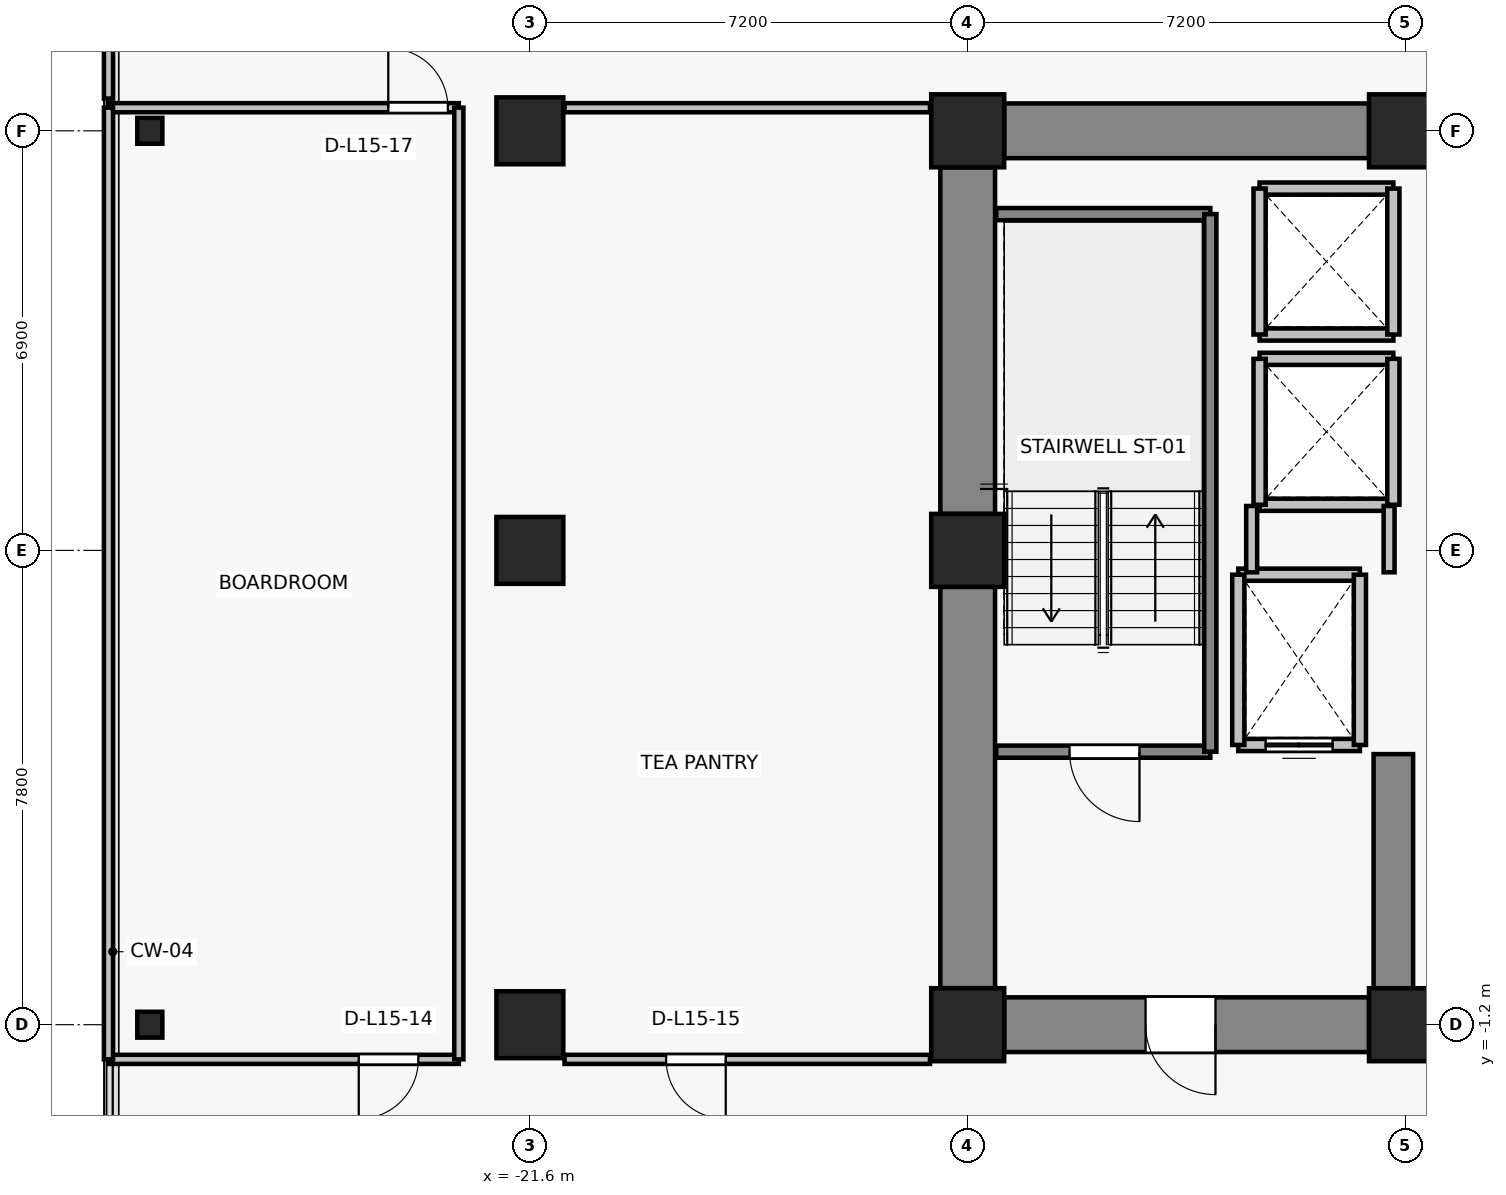
"""IFC4 building model, lengths in metres.
Left out: names, types, materials, properties, quantities, classifications, styles, units other than length and angle.
Written with IfcOpenShell. Run it as: python <this file> out.ifc"""

import sys

from ifc_helpers import new_model, si_unit, direction, frame, frame_2d, origin, origin_2d, place, context, subcontext, project, spatial, rectangle, i_section, extrude, source, transform, mapped, element, fill, save


model = new_model("IFC4")
c1 = context("Model", 3, precision=1e-05, world=origin(), true_north=direction((0.0, 1.0)))
c2 = subcontext(c1, "Body", "Model", "MODEL_VIEW")
j1 = project(units=[si_unit("LENGTHUNIT", "METRE"), si_unit("PLANEANGLEUNIT", "RADIAN")], contexts=[c1])
p1 = place(None, origin())
s1 = spatial("IfcSite", under=j1, at=p1, CompositionType="ELEMENT")
p2 = place(p1, origin())
s2 = spatial("IfcBuilding", under=s1, at=p2, CompositionType="ELEMENT")
p3 = place(p2, frame((0.0, 0.0, 57.1)))
s3 = spatial("IfcBuildingStorey", under=s2, at=p3, CompositionType="ELEMENT", Elevation=57.1)
for number, where, z_axis, x_axis in (
    (1, (-14.4, -1.2, 0.0), (0.0, 0.0, 1.0), (1.0, 0.0, 0.0)),
    (2, (-7.2, -1.2, 0.0), (0.0, 0.0, 1.0), (1.0, 0.0, 0.0)),
    (3, (-14.4, 6.6, 0.0), (0.0, 0.0, 1.0), (1.0, 0.0, 0.0)),
    (4, (-14.4, 13.5, 0.0), (0.0, 0.0, 1.0), (1.0, 0.0, 0.0)),
    (5, (-7.2, 13.5, 0.0), (0.0, 0.0, 1.0), (1.0, 0.0, 0.0)),
):
    element("IfcColumn", number, at=place(p3, frame(where, z_axis=z_axis, x_axis=x_axis)), inside=s3, PredefinedType="COLUMN", context=c2, shape_type="SweptSolid", body=[
        extrude(rectangle(XDim=1.2, YDim=1.2, at=origin_2d()), origin(), (0.0, 0.0, 1.0), 3.3),
    ])
for number, where, z_axis, x_axis in (
    (6, (-21.6, -1.2, 0.0), (0.0, 0.0, 1.0), (1.0, 0.0, 0.0)),
    (7, (-21.6, 6.6, 0.0), (0.0, 0.0, 1.0), (1.0, 0.0, 0.0)),
    (8, (-21.6, 13.5, 0.0), (0.0, 0.0, 1.0), (1.0, 0.0, 0.0)),
):
    element("IfcColumn", number, at=place(p3, frame(where, z_axis=z_axis, x_axis=x_axis)), inside=s3, PredefinedType="COLUMN", context=c2, shape_type="SweptSolid", body=[
        extrude(rectangle(XDim=1.1, YDim=1.1, at=origin_2d()), origin(), (0.0, 0.0, 1.0), 3.3),
    ])
for number, where, z_axis, x_axis in (
    (9, (-27.85, -1.2, 0.0), (0.0, 0.0, 1.0), (1.0, 0.0, 0.0)),
    (10, (-27.85, 13.5, 0.0), (0.0, 0.0, 1.0), (1.0, 0.0, 0.0)),
):
    element("IfcColumn", number, at=place(p3, frame(where, z_axis=z_axis, x_axis=x_axis)), inside=s3, PredefinedType="COLUMN", context=c2, shape_type="SweptSolid", body=[
        extrude(i_section(OverallWidth=0.412, OverallDepth=0.425, WebThickness=0.026, FlangeThickness=0.039, FilletRadius=0.015, at=origin_2d()), origin(), (0.0, 0.0, 1.0), 3.3),
    ])
p4 = place(p3, frame((-13.8, 13.5, 0.0), z_axis=(0.0, 0.0, 1.0), x_axis=(1.0, 0.0, 0.0)))
e11 = element("IfcWall", 11, at=p4, inside=s3, PredefinedType="SHEAR", context=c2, shape_type="SweptSolid", body=[
    extrude(rectangle(XDim=6.0, YDim=0.9, at=frame_2d((3.0, 0.0))), origin(), (0.0, 0.0, 1.0), 3.075),
])
p5 = place(p3, frame((-14.4, -0.6, 0.0), z_axis=(0.0, 0.0, 1.0), x_axis=(0.0, 1.0, 0.0)))
e12 = element("IfcWall", 12, at=p5, inside=s3, PredefinedType="SHEAR", context=c2, shape_type="SweptSolid", body=[
    extrude(rectangle(XDim=6.6, YDim=0.9, at=frame_2d((3.3, 0.0))), origin(), (0.0, 0.0, 1.0), 3.075),
])
p6 = place(p3, frame((-14.4, 7.2, 0.0), z_axis=(0.0, 0.0, 1.0), x_axis=(0.0, 1.0, 0.0)))
e13 = element("IfcWall", 13, at=p6, inside=s3, PredefinedType="SHEAR", context=c2, shape_type="SweptSolid", body=[
    extrude(rectangle(XDim=5.7, YDim=0.9, at=frame_2d((2.85, 0.0))), origin(), (0.0, 0.0, 1.0), 3.075),
])
p7 = place(p3, frame((-7.8, -1.2, 0.0), z_axis=(0.0, 0.0, 1.0), x_axis=(-1.0, 0.0, 0.0)))
e14 = element("IfcWall", 14, at=p7, inside=s3, PredefinedType="SHEAR", context=c2, shape_type="SweptSolid", body=[
    extrude(rectangle(XDim=6.0, YDim=0.9, at=frame_2d((3.0, 0.0))), origin(), (0.0, 0.0, 1.0), 3.075),
])
p8 = place(p7, frame((2.525, 0.0, 0.0)))
e15 = element("IfcOpeningElement", 15, at=p8, cuts=e14, PredefinedType="OPENING", context=c2, shape_type="SweptSolid", body=[
    extrude(rectangle(XDim=1.15, YDim=2.15, at=frame_2d((0.575, 1.075))), frame((0.0, 0.46, 0.0), z_axis=(0.0, -1.0, 0.0), x_axis=(1.0, 0.0, 0.0)), (0.0, 0.0, 1.0), 0.92),
])
p9 = place(p3, frame((-7.4, -0.75, 0.0), z_axis=(0.0, 0.0, 1.0), x_axis=(0.0, 1.0, 0.0)))
e16 = element("IfcWall", 16, at=p9, inside=s3, PredefinedType="SHEAR", context=c2, shape_type="SweptSolid", body=[
    extrude(rectangle(XDim=4.0, YDim=0.65, at=frame_2d((2.0, 0.0))), origin(), (0.0, 0.0, 1.0), 3.075),
])
p10 = place(p3, frame((-7.95, 3.4, 0.0), z_axis=(0.0, 0.0, 1.0), x_axis=(-1.0, 0.0, 0.0)))
e17 = element("IfcWall", 17, at=p10, inside=s3, PredefinedType="SOLIDWALL", context=c2, shape_type="SweptSolid", body=[
    extrude(rectangle(XDim=2.0, YDim=0.2, at=frame_2d((1.0, 0.0))), origin(), (0.0, 0.0, 1.0), 3.075),
])
p11 = place(p10, frame((0.45, 0.0, 0.0)))
e18 = element("IfcOpeningElement", 18, at=p11, cuts=e17, PredefinedType="OPENING", context=c2, shape_type="SweptSolid", body=[
    extrude(rectangle(XDim=1.1, YDim=2.2, at=frame_2d((0.55, 1.1))), frame((0.0, 0.11, 0.0), z_axis=(0.0, -1.0, 0.0), x_axis=(1.0, 0.0, 0.0)), (0.0, 0.0, 1.0), 0.22),
])
p12 = place(p3, frame((-9.95, 6.2, 0.0), z_axis=(0.0, 0.0, 1.0), x_axis=(1.0, 0.0, 0.0)))
e19 = element("IfcWall", 19, at=p12, inside=s3, PredefinedType="SOLIDWALL", context=c2, shape_type="SweptSolid", body=[
    extrude(rectangle(XDim=2.0, YDim=0.2, at=frame_2d((1.0, 0.0))), origin(), (0.0, 0.0, 1.0), 3.075),
])
for number, where, z_axis, x_axis in (
    (20, (-9.95, 3.4, 0.0), (0.0, 0.0, 1.0), (0.0, 1.0, 0.0)),
    (21, (-7.95, 6.2, 0.0), (0.0, 0.0, 1.0), (0.0, -1.0, 0.0)),
):
    element("IfcWall", number, at=place(p3, frame(where, z_axis=z_axis, x_axis=x_axis)), inside=s3, PredefinedType="SOLIDWALL", context=c2, shape_type="SweptSolid", body=[
        extrude(rectangle(XDim=2.8, YDim=0.2, at=frame_2d((1.4, 0.0))), origin(), (0.0, 0.0, 1.0), 3.075),
    ])
for number, where, z_axis, x_axis in (
    (22, (-7.4, 7.35, 0.0), (0.0, 0.0, 1.0), (-1.0, 0.0, 0.0)),
    (23, (-9.6, 9.75, 0.0), (0.0, 0.0, 1.0), (1.0, 0.0, 0.0)),
):
    element("IfcWall", number, at=place(p3, frame(where, z_axis=z_axis, x_axis=x_axis)), inside=s3, PredefinedType="SOLIDWALL", context=c2, shape_type="SweptSolid", body=[
        extrude(rectangle(XDim=2.2, YDim=0.2, at=frame_2d((1.1, 0.0))), origin(), (0.0, 0.0, 1.0), 2.465),
    ])
p13 = place(p3, frame((-9.6, 7.35, 0.0), z_axis=(0.0, 0.0, 1.0), x_axis=(0.0, 1.0, 0.0)))
e24 = element("IfcWall", 24, at=p13, inside=s3, PredefinedType="SOLIDWALL", context=c2, shape_type="SweptSolid", body=[
    extrude(rectangle(XDim=2.4, YDim=0.2, at=frame_2d((1.2, 0.0))), origin(), (0.0, 0.0, 1.0), 3.075),
])
p14 = place(p3, frame((-7.4, 9.75, 0.0), z_axis=(0.0, 0.0, 1.0), x_axis=(0.0, -1.0, 0.0)))
e25 = element("IfcWall", 25, at=p14, inside=s3, PredefinedType="SOLIDWALL", context=c2, shape_type="SweptSolid", body=[
    extrude(rectangle(XDim=2.4, YDim=0.2, at=frame_2d((1.2, 0.0))), origin(), (0.0, 0.0, 1.0), 2.465),
])
for number, where, z_axis, x_axis in (
    (26, (-7.4, 10.15, 0.0), (0.0, 0.0, 1.0), (-1.0, 0.0, 0.0)),
    (27, (-9.6, 12.55, 0.0), (0.0, 0.0, 1.0), (1.0, 0.0, 0.0)),
):
    element("IfcWall", number, at=place(p3, frame(where, z_axis=z_axis, x_axis=x_axis)), inside=s3, PredefinedType="SOLIDWALL", context=c2, shape_type="SweptSolid", body=[
        extrude(rectangle(XDim=2.2, YDim=0.2, at=frame_2d((1.1, 0.0))), origin(), (0.0, 0.0, 1.0), 2.465),
    ])
p15 = place(p3, frame((-9.6, 10.15, 0.0), z_axis=(0.0, 0.0, 1.0), x_axis=(0.0, 1.0, 0.0)))
e28 = element("IfcWall", 28, at=p15, inside=s3, PredefinedType="SOLIDWALL", context=c2, shape_type="SweptSolid", body=[
    extrude(rectangle(XDim=2.4, YDim=0.2, at=frame_2d((1.2, 0.0))), origin(), (0.0, 0.0, 1.0), 3.075),
])
p16 = place(p3, frame((-7.4, 12.55, 0.0), z_axis=(0.0, 0.0, 1.0), x_axis=(0.0, -1.0, 0.0)))
e29 = element("IfcWall", 29, at=p16, inside=s3, PredefinedType="SOLIDWALL", context=c2, shape_type="SweptSolid", body=[
    extrude(rectangle(XDim=2.4, YDim=0.2, at=frame_2d((1.2, 0.0))), origin(), (0.0, 0.0, 1.0), 2.465),
])
p17 = place(p3, frame((-10.41, 3.29, 0.0), z_axis=(0.0, 0.0, 1.0), x_axis=(-1.0, 0.0, 0.0)))
e30 = element("IfcWall", 30, at=p17, inside=s3, PredefinedType="SOLIDWALL", context=c2, shape_type="SweptSolid", body=[
    extrude(rectangle(XDim=3.52, YDim=0.2, at=frame_2d((1.76, 0.0))), origin(), (0.0, 0.0, 1.0), 3.075),
])
p18 = place(p17, frame((1.165, 0.0, 0.0)))
e31 = element("IfcOpeningElement", 31, at=p18, cuts=e30, PredefinedType="OPENING", context=c2, shape_type="SweptSolid", body=[
    extrude(rectangle(XDim=1.15, YDim=2.15, at=frame_2d((0.575, 1.075))), frame((0.0, 0.11, 0.0), z_axis=(0.0, -1.0, 0.0), x_axis=(1.0, 0.0, 0.0)), (0.0, 0.0, 1.0), 0.22),
])
p19 = place(p3, frame((-13.93, 12.13, 0.0), z_axis=(0.0, 0.0, 1.0), x_axis=(1.0, 0.0, 0.0)))
e32 = element("IfcWall", 32, at=p19, inside=s3, PredefinedType="SOLIDWALL", context=c2, shape_type="SweptSolid", body=[
    extrude(rectangle(XDim=3.52, YDim=0.2, at=frame_2d((1.76, 0.0))), origin(), (0.0, 0.0, 1.0), 3.075),
])
p20 = place(p3, frame((-10.41, 12.13, 0.0), z_axis=(0.0, 0.0, 1.0), x_axis=(0.0, -1.0, 0.0)))
e33 = element("IfcWall", 33, at=p20, inside=s3, PredefinedType="SOLIDWALL", context=c2, shape_type="SweptSolid", body=[
    extrude(rectangle(XDim=8.84, YDim=0.2, at=frame_2d((4.42, 0.0))), origin(), (0.0, 0.0, 1.0), 3.075),
])
p21 = place(p3, frame((-9.73, 6.24, 0.0), z_axis=(0.0, 0.0, 1.0), x_axis=(0.0, 1.0, 0.0)))
e34 = element("IfcWall", 34, at=p21, inside=s3, PredefinedType="PARTITIONING", context=c2, shape_type="SweptSolid", body=[
    extrude(rectangle(XDim=1.09, YDim=0.18, at=frame_2d((0.545, 0.0))), origin(), (0.0, 0.0, 1.0), 3.075),
])
p22 = place(p3, frame((-7.47, 7.33, 0.0), z_axis=(0.0, 0.0, 1.0), x_axis=(0.0, -1.0, 0.0)))
e35 = element("IfcWall", 35, at=p22, inside=s3, PredefinedType="PARTITIONING", context=c2, shape_type="SweptSolid", body=[
    extrude(rectangle(XDim=1.09, YDim=0.18, at=frame_2d((0.545, 0.0))), origin(), (0.0, 0.0, 1.0), 2.465),
])
p23 = place(p3, frame((-22.769, -1.77, 0.0), z_axis=(0.0, 0.0, 1.0), x_axis=(-1.0, 0.0, 0.0)))
e36 = element("IfcWall", 36, at=p23, inside=s3, PredefinedType="PARTITIONING", context=c2, shape_type="SweptSolid", body=[
    extrude(rectangle(XDim=5.761, YDim=0.15, at=frame_2d((2.881, 0.0))), origin(), (0.0, 0.0, 1.0), 2.465),
])
p24 = place(p23, frame((0.666, 0.0, 0.0)))
e37 = element("IfcOpeningElement", 37, at=p24, cuts=e36, PredefinedType="OPENING", context=c2, shape_type="SweptSolid", body=[
    extrude(rectangle(XDim=0.98, YDim=2.15, at=frame_2d((0.49, 1.075))), frame((0.0, 0.085, 0.0), z_axis=(0.0, -1.0, 0.0), x_axis=(1.0, 0.0, 0.0)), (0.0, 0.0, 1.0), 0.17),
])
p25 = place(p3, frame((-28.53, 13.88, 0.0), z_axis=(0.0, 0.0, 1.0), x_axis=(1.0, 0.0, 0.0)))
e38 = element("IfcWall", 38, at=p25, inside=s3, PredefinedType="PARTITIONING", context=c2, shape_type="SweptSolid", body=[
    extrude(rectangle(XDim=5.761, YDim=0.15, at=frame_2d((2.881, 0.0))), origin(), (0.0, 0.0, 1.0), 3.075),
])
p26 = place(p25, frame((4.602, 0.0, 0.0)))
e39 = element("IfcOpeningElement", 39, at=p26, cuts=e38, PredefinedType="OPENING", context=c2, shape_type="SweptSolid", body=[
    extrude(rectangle(XDim=0.98, YDim=2.15, at=frame_2d((0.49, 1.075))), frame((0.0, 0.085, 0.0), z_axis=(0.0, -1.0, 0.0), x_axis=(1.0, 0.0, 0.0)), (0.0, 0.0, 1.0), 0.17),
])
p27 = place(p3, frame((-28.53, -1.77, 0.0), z_axis=(0.0, 0.0, 1.0), x_axis=(0.0, 1.0, 0.0)))
e40 = element("IfcWall", 40, at=p27, inside=s3, PredefinedType="PARTITIONING", context=c2, shape_type="SweptSolid", body=[
    extrude(rectangle(XDim=15.65, YDim=0.15, at=frame_2d((7.825, 0.0))), origin(), (0.0, 0.0, 1.0), 3.075),
])
p28 = place(p3, frame((-22.769, 13.88, 0.0), z_axis=(0.0, 0.0, 1.0), x_axis=(0.0, -1.0, 0.0)))
e41 = element("IfcWall", 41, at=p28, inside=s3, PredefinedType="PARTITIONING", context=c2, shape_type="SweptSolid", body=[
    extrude(rectangle(XDim=15.65, YDim=0.15, at=frame_2d((7.825, 0.0))), origin(), (0.0, 0.0, 1.0), 2.465),
])
p29 = place(p3, frame((-15.02, -1.77, 0.0), z_axis=(0.0, 0.0, 1.0), x_axis=(-1.0, 0.0, 0.0)))
e42 = element("IfcWall", 42, at=p29, inside=s3, PredefinedType="PARTITIONING", context=c2, shape_type="SweptSolid", body=[
    extrude(rectangle(XDim=6.01, YDim=0.15, at=frame_2d((3.005, 0.0))), origin(), (0.0, 0.0, 1.0), 3.075),
])
p30 = place(p29, frame((3.359, 0.0, 0.0)))
e43 = element("IfcOpeningElement", 43, at=p30, cuts=e42, PredefinedType="OPENING", context=c2, shape_type="SweptSolid", body=[
    extrude(rectangle(XDim=0.98, YDim=2.15, at=frame_2d((0.49, 1.075))), frame((0.0, 0.085, 0.0), z_axis=(0.0, -1.0, 0.0), x_axis=(1.0, 0.0, 0.0)), (0.0, 0.0, 1.0), 0.17),
])
p31 = place(p3, frame((-21.03, 13.88, 0.0), z_axis=(0.0, 0.0, 1.0), x_axis=(1.0, 0.0, 0.0)))
e44 = element("IfcWall", 44, at=p31, inside=s3, PredefinedType="PARTITIONING", context=c2, shape_type="SweptSolid", body=[
    extrude(rectangle(XDim=6.01, YDim=0.15, at=frame_2d((3.005, 0.0))), origin(), (0.0, 0.0, 1.0), 3.075),
])
p32 = place(p3, frame((-28.53, 14.03, 0.0), z_axis=(0.0, 0.0, 1.0), x_axis=(0.0, 1.0, 0.0)))
e45 = element("IfcWall", 45, at=p32, inside=s3, PredefinedType="PARTITIONING", context=c2, shape_type="SweptSolid", body=[
    extrude(rectangle(XDim=4.1, YDim=0.15, at=frame_2d((2.05, 0.0))), origin(), (0.0, 0.0, 1.0), 3.075),
])
m1 = source(origin(), c2, "Body", "SweptSolid", [
    extrude(rectangle(XDim=1.1, YDim=2.2, at=frame_2d((0.55, 1.1))), frame((0.0, 0.025, 0.0), z_axis=(0.0, -1.0, 0.0), x_axis=(1.0, 0.0, 0.0)), (0.0, 0.0, 1.0), 0.05),
])
p33 = place(p11, origin())
e46 = element("IfcDoor", 46, at=p33, inside=s3, OperationType="DOUBLE_DOOR_SLIDING", PredefinedType="DOOR", context=c2, shape_type="MappedRepresentation", body=[
    mapped(m1, transform((0.0, 0.0, 0.0), x_axis=(1.0, 0.0, 0.0), y_axis=(0.0, 1.0, 0.0), z_axis=(0.0, 0.0, 1.0), scale=1.0)),
])
fill(e18, e46)
m2 = source(origin(), c2, "Body", "SweptSolid", [
    extrude(rectangle(XDim=1.15, YDim=2.15, at=frame_2d((0.575, 1.075))), frame((0.0, 0.025, 0.0), z_axis=(0.0, -1.0, 0.0), x_axis=(1.0, 0.0, 0.0)), (0.0, 0.0, 1.0), 0.05),
])
p34 = place(p18, origin())
e47 = element("IfcDoor", 47, at=p34, inside=s3, OperationType="SINGLE_SWING_LEFT", PredefinedType="DOOR", context=c2, shape_type="MappedRepresentation", body=[
    mapped(m2, transform((0.0, 0.0, 0.0), x_axis=(1.0, 0.0, 0.0), y_axis=(0.0, 1.0, 0.0), z_axis=(0.0, 0.0, 1.0), scale=1.0)),
])
fill(e31, e47)
p35 = place(p8, origin())
e48 = element("IfcDoor", 48, at=p35, inside=s3, OperationType="SINGLE_SWING_LEFT", PredefinedType="DOOR", context=c2, shape_type="MappedRepresentation", body=[
    mapped(m2, transform((0.0, 0.0, 0.0), x_axis=(1.0, 0.0, 0.0), y_axis=(0.0, 1.0, 0.0), z_axis=(0.0, 0.0, 1.0), scale=1.0)),
])
fill(e15, e48)
m3 = source(origin(), c2, "Body", "SweptSolid", [
    extrude(rectangle(XDim=0.98, YDim=2.15, at=frame_2d((0.49, 1.075))), frame((0.0, 0.025, 0.0), z_axis=(0.0, -1.0, 0.0), x_axis=(1.0, 0.0, 0.0)), (0.0, 0.0, 1.0), 0.05),
])
p36 = place(p24, origin())
e49 = element("IfcDoor", 49, at=p36, inside=s3, OperationType="SINGLE_SWING_RIGHT", PredefinedType="DOOR", context=c2, shape_type="MappedRepresentation", body=[
    mapped(m3, transform((0.0, 0.0, 0.0), x_axis=(1.0, 0.0, 0.0), y_axis=(0.0, 1.0, 0.0), z_axis=(0.0, 0.0, 1.0), scale=1.0)),
])
fill(e37, e49)
p37 = place(p30, origin())
e50 = element("IfcDoor", 50, at=p37, inside=s3, OperationType="SINGLE_SWING_LEFT", PredefinedType="DOOR", context=c2, shape_type="MappedRepresentation", body=[
    mapped(m3, transform((0.0, 0.0, 0.0), x_axis=(1.0, 0.0, 0.0), y_axis=(0.0, 1.0, 0.0), z_axis=(0.0, 0.0, 1.0), scale=1.0)),
])
fill(e43, e50)
p38 = place(p26, origin())
e51 = element("IfcDoor", 51, at=p38, inside=s3, OperationType="SINGLE_SWING_LEFT", PredefinedType="DOOR", context=c2, shape_type="MappedRepresentation", body=[
    mapped(m3, transform((0.0, 0.0, 0.0), x_axis=(1.0, 0.0, 0.0), y_axis=(0.0, 1.0, 0.0), z_axis=(0.0, 0.0, 1.0), scale=1.0)),
])
fill(e39, e51)
save(model, sys.argv[1])
